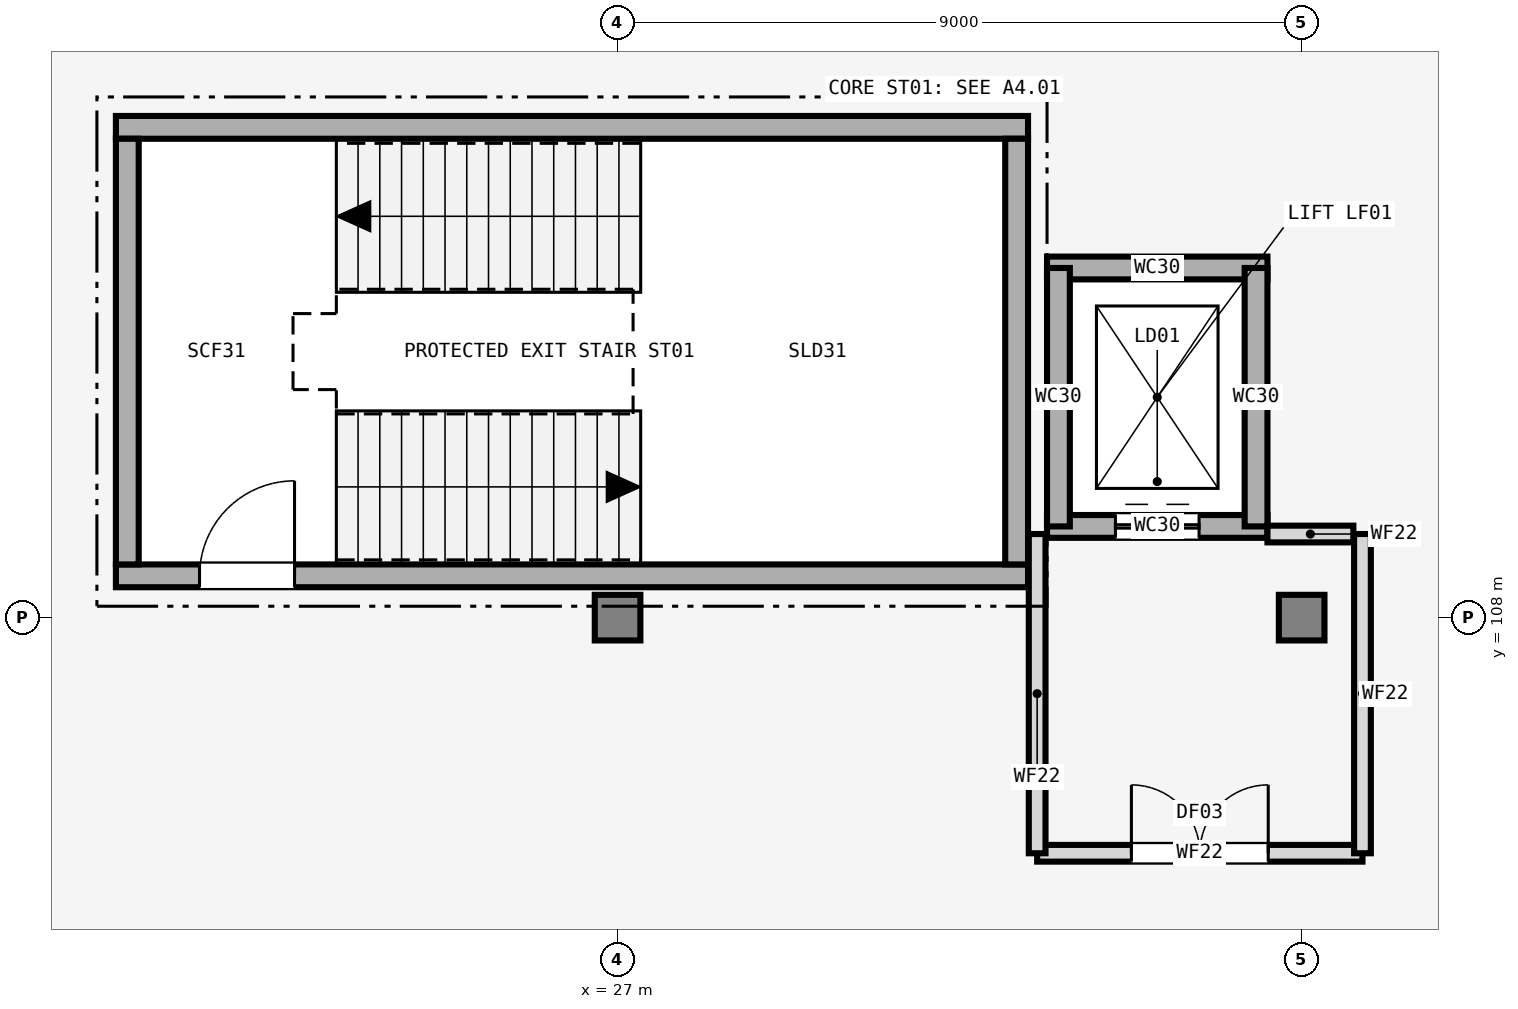
"""IFC4 building model, lengths in metres.
Left out: names, types, materials, properties, quantities, classifications, styles, units other than length and angle.
Written with IfcOpenShell. Run it as: python <this file> out.ifc"""

import sys

from ifc_helpers import new_model, si_unit, direction, frame, frame_2d, origin, origin_2d, place, context, subcontext, project, spatial, rectangle, extrude, element, fill, save


model = new_model("IFC4")
c1 = context("Model", 3, precision=1e-05, world=origin(), true_north=direction((0.0, 1.0)))
c2 = subcontext(c1, "Body", "Model", "MODEL_VIEW")
j1 = project(units=[si_unit("LENGTHUNIT", "METRE"), si_unit("PLANEANGLEUNIT", "RADIAN")], contexts=[c1])
p1 = place(None, origin())
s1 = spatial("IfcSite", under=j1, at=p1, CompositionType="ELEMENT")
p2 = place(p1, origin())
s2 = spatial("IfcBuilding", under=s1, at=p2, CompositionType="ELEMENT")
p3 = place(p2, frame((0.0, 0.0, 4.8)))
s3 = spatial("IfcBuildingStorey", under=s2, at=p3, CompositionType="ELEMENT", Elevation=4.8)
for number, where, z_axis, x_axis in (
    (1, (27.0, 108.0, 0.0), (0.0, 0.0, 1.0), (1.0, 0.0, 0.0)),
    (2, (36.0, 108.0, 0.0), (0.0, 0.0, 1.0), (1.0, 0.0, 0.0)),
):
    element("IfcColumn", number, at=place(p3, frame(where, z_axis=z_axis, x_axis=x_axis)), inside=s3, PredefinedType="COLUMN", context=c2, shape_type="SweptSolid", body=[
        extrude(rectangle(XDim=0.6, YDim=0.6, at=origin_2d()), origin(), (0.0, 0.0, 1.0), 4.5),
    ])
p4 = place(p3, frame((20.4, 108.55, 0.0), z_axis=(0.0, 0.0, 1.0), x_axis=(1.0, 0.0, 0.0)))
e3 = element("IfcWall", 3, at=p4, inside=s3, PredefinedType="SHEAR", context=c2, shape_type="SweptSolid", body=[
    extrude(rectangle(XDim=12.0, YDim=0.3, at=frame_2d((6.0, 0.0))), origin(), (0.0, 0.0, 1.0), 4.5),
])
p5 = place(p4, frame((1.1, 0.0, 0.0)))
e4 = element("IfcOpeningElement", 4, at=p5, cuts=e3, PredefinedType="OPENING", context=c2, shape_type="SweptSolid", body=[
    extrude(rectangle(XDim=1.25, YDim=2.15, at=frame_2d((0.625, 1.075))), frame((0.0, 0.16, 0.0), z_axis=(0.0, -1.0, 0.0), x_axis=(1.0, 0.0, 0.0)), (0.0, 0.0, 1.0), 0.32),
])
p6 = place(p3, frame((32.4, 114.45, 0.0), z_axis=(0.0, 0.0, 1.0), x_axis=(-1.0, 0.0, 0.0)))
e5 = element("IfcWall", 5, at=p6, inside=s3, PredefinedType="SHEAR", context=c2, shape_type="SweptSolid", body=[
    extrude(rectangle(XDim=12.0, YDim=0.3, at=frame_2d((6.0, 0.0))), origin(), (0.0, 0.0, 1.0), 4.5),
])
for number, where, z_axis, x_axis in (
    (6, (20.55, 114.3, 0.0), (0.0, 0.0, 1.0), (0.0, -1.0, 0.0)),
    (7, (32.25, 108.7, 0.0), (0.0, 0.0, 1.0), (0.0, 1.0, 0.0)),
):
    element("IfcWall", number, at=place(p3, frame(where, z_axis=z_axis, x_axis=x_axis)), inside=s3, PredefinedType="SHEAR", context=c2, shape_type="SweptSolid", body=[
        extrude(rectangle(XDim=5.6, YDim=0.3, at=frame_2d((2.8, 0.0))), origin(), (0.0, 0.0, 1.0), 4.5),
    ])
p7 = place(p3, frame((32.65, 109.2, 0.0), z_axis=(0.0, 0.0, 1.0), x_axis=(1.0, 0.0, 0.0)))
e8 = element("IfcWall", 8, at=p7, inside=s3, PredefinedType="SHEAR", context=c2, shape_type="SweptSolid", body=[
    extrude(rectangle(XDim=2.9, YDim=0.3, at=frame_2d((1.45, 0.0))), origin(), (0.0, 0.0, 1.0), 4.5),
])
p8 = place(p7, frame((0.9, 0.0, 0.0)))
e9 = element("IfcOpeningElement", 9, at=p8, cuts=e8, PredefinedType="OPENING", context=c2, shape_type="SweptSolid", body=[
    extrude(rectangle(XDim=1.1, YDim=2.15, at=frame_2d((0.55, 1.075))), frame((0.0, 0.16, 0.0), z_axis=(0.0, -1.0, 0.0), x_axis=(1.0, 0.0, 0.0)), (0.0, 0.0, 1.0), 0.32),
])
p9 = place(p3, frame((35.55, 112.6, 0.0), z_axis=(0.0, 0.0, 1.0), x_axis=(-1.0, 0.0, 0.0)))
e10 = element("IfcWall", 10, at=p9, inside=s3, PredefinedType="SHEAR", context=c2, shape_type="SweptSolid", body=[
    extrude(rectangle(XDim=2.9, YDim=0.3, at=frame_2d((1.45, 0.0))), origin(), (0.0, 0.0, 1.0), 4.5),
])
for number, where, z_axis, x_axis in (
    (11, (32.8, 112.6, 0.0), (0.0, 0.0, 1.0), (0.0, -1.0, 0.0)),
    (12, (35.4, 109.2, 0.0), (0.0, 0.0, 1.0), (0.0, 1.0, 0.0)),
):
    element("IfcWall", number, at=place(p3, frame(where, z_axis=z_axis, x_axis=x_axis)), inside=s3, PredefinedType="SHEAR", context=c2, shape_type="SweptSolid", body=[
        extrude(rectangle(XDim=3.4, YDim=0.3, at=frame_2d((1.7, 0.0))), origin(), (0.0, 0.0, 1.0), 4.5),
    ])
p10 = place(p3, frame((32.52, 104.9, 0.0), z_axis=(0.0, 0.0, 1.0), x_axis=(1.0, 0.0, 0.0)))
e13 = element("IfcWall", 13, at=p10, inside=s3, PredefinedType="SOLIDWALL", context=c2, shape_type="SweptSolid", body=[
    extrude(rectangle(XDim=4.28, YDim=0.22, at=frame_2d((2.14, 0.0))), origin(), (0.0, 0.0, 1.0), 3.4),
])
p11 = place(p10, frame((1.24, 0.0, 0.0)))
e14 = element("IfcOpeningElement", 14, at=p11, cuts=e13, PredefinedType="OPENING", context=c2, shape_type="SweptSolid", body=[
    extrude(rectangle(XDim=1.8, YDim=2.2, at=frame_2d((0.9, 1.1))), frame((0.0, 0.12, 0.0), z_axis=(0.0, -1.0, 0.0), x_axis=(1.0, 0.0, 0.0)), (0.0, 0.0, 1.0), 0.24),
])
for number, where, z_axis, x_axis in (
    (15, (32.52, 104.9, 0.0), (0.0, 0.0, 1.0), (0.0, 1.0, 0.0)),
    (16, (36.8, 104.9, 0.0), (0.0, 0.0, 1.0), (0.0, 1.0, 0.0)),
):
    element("IfcWall", number, at=place(p3, frame(where, z_axis=z_axis, x_axis=x_axis)), inside=s3, PredefinedType="SOLIDWALL", context=c2, shape_type="SweptSolid", body=[
        extrude(rectangle(XDim=4.2, YDim=0.22, at=frame_2d((2.1, 0.0))), origin(), (0.0, 0.0, 1.0), 3.4),
    ])
p12 = place(p3, frame((35.55, 109.1, 0.0), z_axis=(0.0, 0.0, 1.0), x_axis=(1.0, 0.0, 0.0)))
e17 = element("IfcWall", 17, at=p12, inside=s3, PredefinedType="SOLIDWALL", context=c2, shape_type="SweptSolid", body=[
    extrude(rectangle(XDim=1.13, YDim=0.22, at=frame_2d((0.565, 0.0))), origin(), (0.0, 0.0, 1.0), 3.4),
])
p13 = place(p5, origin())
e18 = element("IfcDoor", 18, at=p13, inside=s3, OperationType="SINGLE_SWING_RIGHT", PredefinedType="DOOR", context=c2, shape_type="SweptSolid", body=[
    extrude(rectangle(XDim=1.25, YDim=2.15, at=frame_2d((0.625, 1.075))), frame((0.0, 0.025, 0.0), z_axis=(0.0, -1.0, 0.0), x_axis=(1.0, 0.0, 0.0)), (0.0, 0.0, 1.0), 0.05),
])
fill(e4, e18)
p14 = place(p8, origin())
e19 = element("IfcDoor", 19, at=p14, inside=s3, OperationType="DOUBLE_DOOR_SLIDING", PredefinedType="DOOR", context=c2, shape_type="SweptSolid", body=[
    extrude(rectangle(XDim=1.1, YDim=2.15, at=frame_2d((0.55, 1.075))), frame((0.0, 0.025, 0.0), z_axis=(0.0, -1.0, 0.0), x_axis=(1.0, 0.0, 0.0)), (0.0, 0.0, 1.0), 0.05),
])
fill(e9, e19)
p15 = place(p11, origin())
e20 = element("IfcDoor", 20, at=p15, inside=s3, OperationType="DOUBLE_DOOR_SINGLE_SWING", PredefinedType="DOOR", context=c2, shape_type="SweptSolid", body=[
    extrude(rectangle(XDim=1.8, YDim=2.2, at=frame_2d((0.9, 1.1))), frame((0.0, 0.025, 0.0), z_axis=(0.0, -1.0, 0.0), x_axis=(1.0, 0.0, 0.0)), (0.0, 0.0, 1.0), 0.05),
])
fill(e14, e20)
save(model, sys.argv[1])
